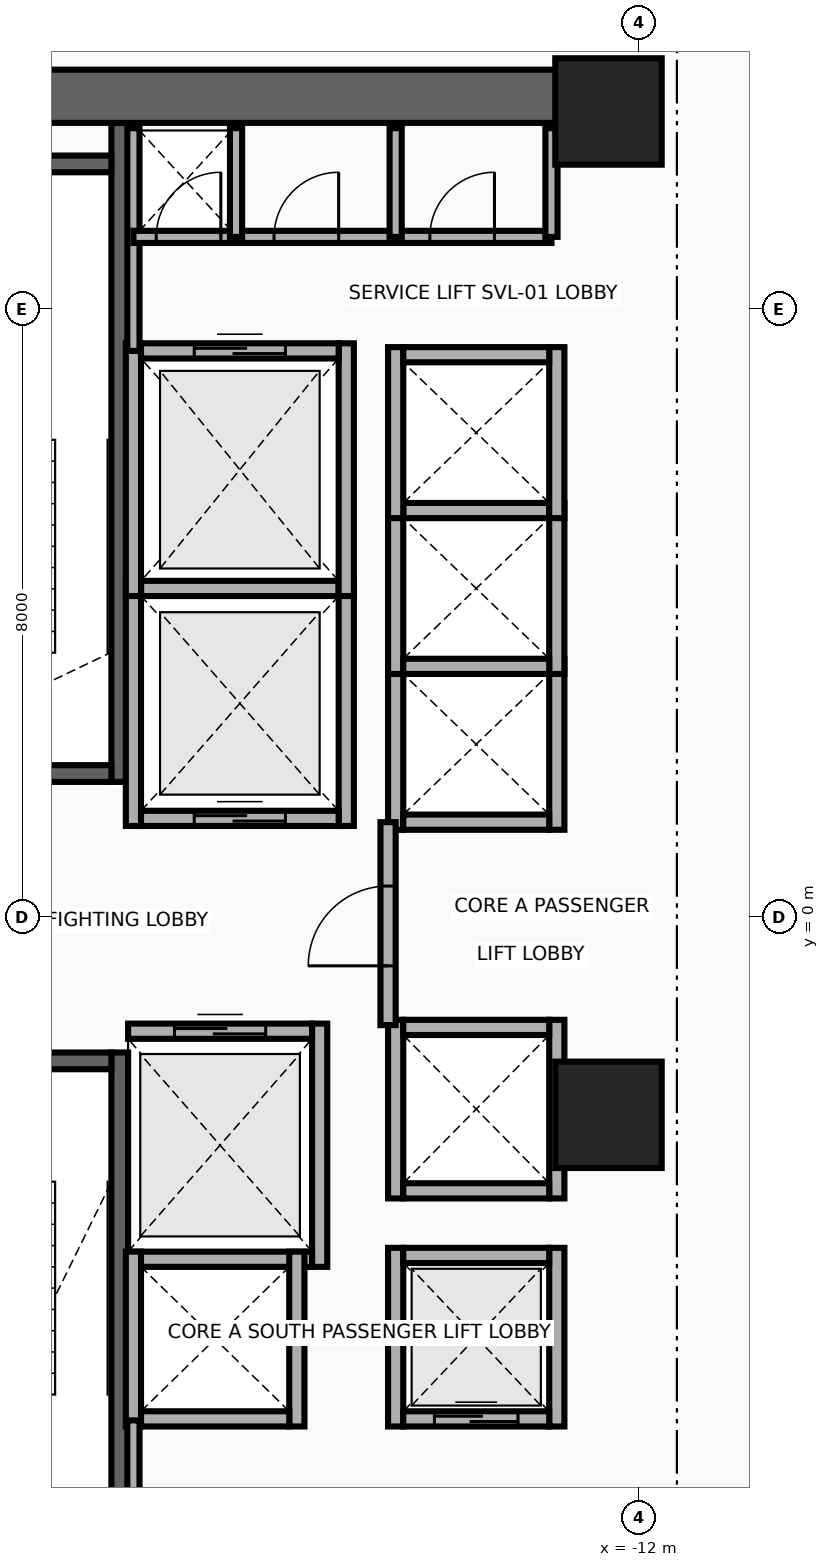
"""IFC4 building model, lengths in metres.
Left out: names, types, materials, properties, quantities, classifications, styles, units other than length and angle.
Written with IfcOpenShell. Run it as: python <this file> out.ifc"""

import sys

from ifc_helpers import new_model, si_unit, direction, frame, frame_2d, origin, origin_2d, place, context, subcontext, project, spatial, rectangle, extrude, source, transform, mapped, element, fill, save


model = new_model("IFC4")
c1 = context("Model", 3, precision=1e-05, world=origin(), true_north=direction((0.0, 1.0)))
c2 = subcontext(c1, "Body", "Model", "MODEL_VIEW")
j1 = project(units=[si_unit("LENGTHUNIT", "METRE"), si_unit("PLANEANGLEUNIT", "RADIAN")], contexts=[c1])
p1 = place(None, origin())
s1 = spatial("IfcSite", under=j1, at=p1, CompositionType="ELEMENT")
p2 = place(p1, origin())
s2 = spatial("IfcBuilding", under=s1, at=p2, CompositionType="ELEMENT")
p3 = place(p2, frame((0.0, 0.0, 55.6)))
s3 = spatial("IfcBuildingStorey", under=s2, at=p3, CompositionType="ELEMENT", Elevation=55.6)
p4 = place(p3, frame((-18.83, 1.78, 0.0), z_axis=(0.0, 0.0, 1.0), x_axis=(0.0, 1.0, 0.0)))
e1 = element("IfcWall", 1, at=p4, inside=s3, PredefinedType="SHEAR", context=c2, shape_type="SweptSolid", body=[
    extrude(rectangle(XDim=8.67, YDim=0.22, at=frame_2d((4.335, 0.0))), origin(), (0.0, 0.0, 1.0), 3.46),
])
p5 = place(p3, frame((-22.05, 1.89, 0.0), z_axis=(0.0, 0.0, 1.0), x_axis=(1.0, 0.0, 0.0)))
e2 = element("IfcWall", 2, at=p5, inside=s3, PredefinedType="SHEAR", context=c2, shape_type="SweptSolid", body=[
    extrude(rectangle(XDim=3.11, YDim=0.22, at=frame_2d((1.555, 0.0))), origin(), (0.0, 0.0, 1.0), 3.46),
])
p6 = place(p5, frame((1.0, 0.0, 0.0)))
e3 = element("IfcOpeningElement", 3, at=p6, cuts=e2, PredefinedType="OPENING", context=c2, shape_type="SweptSolid", body=[
    extrude(rectangle(XDim=1.1, YDim=2.15, at=frame_2d((0.55, 1.075))), frame((0.0, 0.125, 0.0), z_axis=(0.0, -1.0, 0.0), x_axis=(1.0, 0.0, 0.0)), (0.0, 0.0, 1.0), 0.25),
])
p7 = place(p3, frame((-22.05, 9.91, 0.0), z_axis=(0.0, 0.0, 1.0), x_axis=(1.0, 0.0, 0.0)))
e4 = element("IfcWall", 4, at=p7, inside=s3, PredefinedType="SHEAR", context=c2, shape_type="SweptSolid", body=[
    extrude(rectangle(XDim=3.11, YDim=0.22, at=frame_2d((1.555, 0.0))), origin(), (0.0, 0.0, 1.0), 3.46),
])
p8 = place(p3, frame((-18.83, -10.45, 0.0), z_axis=(0.0, 0.0, 1.0), x_axis=(0.0, 1.0, 0.0)))
e5 = element("IfcWall", 5, at=p8, inside=s3, PredefinedType="SHEAR", context=c2, shape_type="SweptSolid", body=[
    extrude(rectangle(XDim=8.67, YDim=0.22, at=frame_2d((4.335, 0.0))), origin(), (0.0, 0.0, 1.0), 3.46),
])
p9 = place(p3, frame((-22.05, -1.89, 0.0), z_axis=(0.0, 0.0, 1.0), x_axis=(1.0, 0.0, 0.0)))
e6 = element("IfcWall", 6, at=p9, inside=s3, PredefinedType="SHEAR", context=c2, shape_type="SweptSolid", body=[
    extrude(rectangle(XDim=3.11, YDim=0.22, at=frame_2d((1.555, 0.0))), origin(), (0.0, 0.0, 1.0), 3.46),
])
p10 = place(p9, frame((1.0, 0.0, 0.0)))
e7 = element("IfcOpeningElement", 7, at=p10, cuts=e6, PredefinedType="OPENING", context=c2, shape_type="SweptSolid", body=[
    extrude(rectangle(XDim=1.1, YDim=2.15, at=frame_2d((0.55, 1.075))), frame((0.0, 0.125, 0.0), z_axis=(0.0, -1.0, 0.0), x_axis=(1.0, 0.0, 0.0)), (0.0, 0.0, 1.0), 0.25),
])
p11 = place(p3, frame((-22.65, 10.8, 0.0), z_axis=(0.0, 0.0, 1.0), x_axis=(1.0, 0.0, 0.0)))
e8 = element("IfcWall", 8, at=p11, inside=s3, PredefinedType="SHEAR", context=c2, shape_type="SweptSolid", body=[
    extrude(rectangle(XDim=10.25, YDim=0.7, at=frame_2d((5.125, 0.0))), origin(), (0.0, 0.0, 1.0), 3.46),
])
m1 = source(origin(), c2, "Body", "SweptSolid", [
    extrude(rectangle(XDim=1.4, YDim=1.4, at=origin_2d()), origin(), (0.0, 0.0, 1.0), 3.7),
])
for number, where, z_axis, x_axis in (
    (9, (-12.4, -2.6, 0.0), (0.0, 0.0, 1.0), (1.0, 0.0, 0.0)),
    (10, (-12.4, 10.6, 0.0), (0.0, 0.0, 1.0), (1.0, 0.0, 0.0)),
):
    element("IfcColumn", number, at=place(p3, frame(where, z_axis=z_axis, x_axis=x_axis)), inside=s3, PredefinedType="COLUMN", context=c2, shape_type="MappedRepresentation", body=[
        mapped(m1, transform((0.0, 0.0, 0.0), x_axis=(1.0, 0.0, 0.0), y_axis=(0.0, 1.0, 0.0), z_axis=(0.0, 0.0, 1.0), scale=1.0)),
    ])
for number, where, z_axis, x_axis in (
    (11, (-18.65, 1.2, 0.0), (0.0, 0.0, 1.0), (0.0, 1.0, 0.0)),
    (12, (-15.85, 1.2, 0.0), (0.0, 0.0, 1.0), (0.0, 1.0, 0.0)),
):
    element("IfcWall", number, at=place(p3, frame(where, z_axis=z_axis, x_axis=x_axis)), inside=s3, PredefinedType="MOVABLE", context=c2, shape_type="SweptSolid", body=[
        extrude(rectangle(XDim=3.225, YDim=0.2, at=frame_2d((1.613, 0.0))), origin(), (0.0, 0.0, 1.0), 3.46),
    ])
p12 = place(p3, frame((-18.55, 1.3, 0.0), z_axis=(0.0, 0.0, 1.0), x_axis=(1.0, 0.0, 0.0)))
e13 = element("IfcWall", 13, at=p12, inside=s3, PredefinedType="MOVABLE", context=c2, shape_type="SweptSolid", body=[
    extrude(rectangle(XDim=2.6, YDim=0.2, at=frame_2d((1.3, 0.0))), origin(), (0.0, 0.0, 1.0), 3.46),
])
p13 = place(p12, frame((0.7, 0.0, 0.0)))
e14 = element("IfcOpeningElement", 14, at=p13, cuts=e13, PredefinedType="OPENING", context=c2, shape_type="SweptSolid", body=[
    extrude(rectangle(XDim=1.2, YDim=2.1, at=frame_2d((0.6, 1.05))), frame((0.0, 0.115, 0.0), z_axis=(0.0, -1.0, 0.0), x_axis=(1.0, 0.0, 0.0)), (0.0, 0.0, 1.0), 0.23),
])
p14 = place(p3, frame((-18.55, 4.325, 0.0), z_axis=(0.0, 0.0, 1.0), x_axis=(1.0, 0.0, 0.0)))
e15 = element("IfcWall", 15, at=p14, inside=s3, PredefinedType="MOVABLE", context=c2, shape_type="SweptSolid", body=[
    extrude(rectangle(XDim=2.6, YDim=0.2, at=frame_2d((1.3, 0.0))), origin(), (0.0, 0.0, 1.0), 3.46),
])
p15 = place(p3, frame((-16.2, -4.6, 0.0), z_axis=(0.0, 0.0, 1.0), x_axis=(0.0, 1.0, 0.0)))
e16 = element("IfcWall", 16, at=p15, inside=s3, PredefinedType="MOVABLE", context=c2, shape_type="SweptSolid", body=[
    extrude(rectangle(XDim=3.2, YDim=0.2, at=frame_2d((1.6, 0.0))), origin(), (0.0, 0.0, 1.0), 3.46),
])
p16 = place(p3, frame((-18.72, -4.5, 0.0), z_axis=(0.0, 0.0, 1.0), x_axis=(1.0, 0.0, 0.0)))
e17 = element("IfcWall", 17, at=p16, inside=s3, PredefinedType="MOVABLE", context=c2, shape_type="SweptSolid", body=[
    extrude(rectangle(XDim=2.42, YDim=0.2, at=frame_2d((1.21, 0.0))), origin(), (0.0, 0.0, 1.0), 3.46),
])
p17 = place(p3, frame((-18.72, -1.5, 0.0), z_axis=(0.0, 0.0, 1.0), x_axis=(1.0, 0.0, 0.0)))
e18 = element("IfcWall", 18, at=p17, inside=s3, PredefinedType="MOVABLE", context=c2, shape_type="SweptSolid", body=[
    extrude(rectangle(XDim=2.42, YDim=0.2, at=frame_2d((1.21, 0.0))), origin(), (0.0, 0.0, 1.0), 3.46),
])
p18 = place(p17, frame((0.61, 0.0, 0.0)))
e19 = element("IfcOpeningElement", 19, at=p18, cuts=e18, PredefinedType="OPENING", context=c2, shape_type="SweptSolid", body=[
    extrude(rectangle(XDim=1.2, YDim=2.1, at=frame_2d((0.6, 1.05))), frame((0.0, 0.115, 0.0), z_axis=(0.0, -1.0, 0.0), x_axis=(1.0, 0.0, 0.0)), (0.0, 0.0, 1.0), 0.23),
])
for number, where, z_axis, x_axis in (
    (20, (-18.65, 4.225, 0.0), (0.0, 0.0, 1.0), (0.0, 1.0, 0.0)),
    (21, (-15.85, 4.225, 0.0), (0.0, 0.0, 1.0), (0.0, 1.0, 0.0)),
):
    element("IfcWall", number, at=place(p3, frame(where, z_axis=z_axis, x_axis=x_axis)), inside=s3, PredefinedType="MOVABLE", context=c2, shape_type="SweptSolid", body=[
        extrude(rectangle(XDim=3.325, YDim=0.2, at=frame_2d((1.663, 0.0))), origin(), (0.0, 0.0, 1.0), 3.46),
    ])
p19 = place(p3, frame((-18.55, 7.45, 0.0), z_axis=(0.0, 0.0, 1.0), x_axis=(1.0, 0.0, 0.0)))
e22 = element("IfcWall", 22, at=p19, inside=s3, PredefinedType="MOVABLE", context=c2, shape_type="SweptSolid", body=[
    extrude(rectangle(XDim=2.6, YDim=0.2, at=frame_2d((1.3, 0.0))), origin(), (0.0, 0.0, 1.0), 3.46),
])
p20 = place(p19, frame((0.7, 0.0, 0.0)))
e23 = element("IfcOpeningElement", 23, at=p20, cuts=e22, PredefinedType="OPENING", context=c2, shape_type="SweptSolid", body=[
    extrude(rectangle(XDim=1.2, YDim=2.1, at=frame_2d((0.6, 1.05))), frame((0.0, 0.115, 0.0), z_axis=(0.0, -1.0, 0.0), x_axis=(1.0, 0.0, 0.0)), (0.0, 0.0, 1.0), 0.23),
])
for number, where, z_axis, x_axis in (
    (24, (-15.2, -6.7, 0.0), (0.0, 0.0, 1.0), (0.0, 1.0, 0.0)),
    (25, (-13.08, -6.7, 0.0), (0.0, 0.0, 1.0), (0.0, 1.0, 0.0)),
):
    element("IfcWall", number, at=place(p3, frame(where, z_axis=z_axis, x_axis=x_axis)), inside=s3, PredefinedType="MOVABLE", context=c2, shape_type="SweptSolid", body=[
        extrude(rectangle(XDim=2.35, YDim=0.2, at=frame_2d((1.175, 0.0))), origin(), (0.0, 0.0, 1.0), 3.46),
    ])
p21 = place(p3, frame((-15.1, -6.6, 0.0), z_axis=(0.0, 0.0, 1.0), x_axis=(1.0, 0.0, 0.0)))
e26 = element("IfcWall", 26, at=p21, inside=s3, PredefinedType="MOVABLE", context=c2, shape_type="SweptSolid", body=[
    extrude(rectangle(XDim=1.92, YDim=0.2, at=frame_2d((0.96, 0.0))), origin(), (0.0, 0.0, 1.0), 3.46),
])
p22 = place(p21, frame((0.41, 0.0, 0.0)))
e27 = element("IfcOpeningElement", 27, at=p22, cuts=e26, PredefinedType="OPENING", context=c2, shape_type="SweptSolid", body=[
    extrude(rectangle(XDim=1.1, YDim=2.1, at=frame_2d((0.55, 1.05))), frame((0.0, 0.115, 0.0), z_axis=(0.0, -1.0, 0.0), x_axis=(1.0, 0.0, 0.0)), (0.0, 0.0, 1.0), 0.23),
])
p23 = place(p3, frame((-15.1, -4.45, 0.0), z_axis=(0.0, 0.0, 1.0), x_axis=(1.0, 0.0, 0.0)))
e28 = element("IfcWall", 28, at=p23, inside=s3, PredefinedType="MOVABLE", context=c2, shape_type="SweptSolid", body=[
    extrude(rectangle(XDim=1.92, YDim=0.2, at=frame_2d((0.96, 0.0))), origin(), (0.0, 0.0, 1.0), 3.46),
])
for number, where, z_axis, x_axis in (
    (29, (-15.2, 1.15, 0.0), (0.0, 0.0, 1.0), (0.0, 1.0, 0.0)),
    (30, (-13.08, 1.15, 0.0), (0.0, 0.0, 1.0), (0.0, 1.0, 0.0)),
):
    element("IfcWall", number, at=place(p3, frame(where, z_axis=z_axis, x_axis=x_axis)), inside=s3, PredefinedType="MOVABLE", context=c2, shape_type="SweptSolid", body=[
        extrude(rectangle(XDim=2.25, YDim=0.2, at=frame_2d((1.125, 0.0))), origin(), (0.0, 0.0, 1.0), 3.46),
    ])
p24 = place(p3, frame((-15.1, 1.25, 0.0), z_axis=(0.0, 0.0, 1.0), x_axis=(1.0, 0.0, 0.0)))
e31 = element("IfcWall", 31, at=p24, inside=s3, PredefinedType="MOVABLE", context=c2, shape_type="SweptSolid", body=[
    extrude(rectangle(XDim=1.92, YDim=0.2, at=frame_2d((0.96, 0.0))), origin(), (0.0, 0.0, 1.0), 3.46),
])
for number, where, z_axis, x_axis in (
    (32, (-15.2, 3.2, 0.0), (0.0, 0.0, 1.0), (0.0, 1.0, 0.0)),
    (33, (-13.08, 3.2, 0.0), (0.0, 0.0, 1.0), (0.0, 1.0, 0.0)),
):
    element("IfcWall", number, at=place(p3, frame(where, z_axis=z_axis, x_axis=x_axis)), inside=s3, PredefinedType="MOVABLE", context=c2, shape_type="SweptSolid", body=[
        extrude(rectangle(XDim=2.25, YDim=0.2, at=frame_2d((1.125, 0.0))), origin(), (0.0, 0.0, 1.0), 3.46),
    ])
for number, where, z_axis, x_axis in (
    (34, (-15.1, 3.3, 0.0), (0.0, 0.0, 1.0), (1.0, 0.0, 0.0)),
    (35, (-15.1, 5.35, 0.0), (0.0, 0.0, 1.0), (1.0, 0.0, 0.0)),
):
    element("IfcWall", number, at=place(p3, frame(where, z_axis=z_axis, x_axis=x_axis)), inside=s3, PredefinedType="MOVABLE", context=c2, shape_type="SweptSolid", body=[
        extrude(rectangle(XDim=1.92, YDim=0.2, at=frame_2d((0.96, 0.0))), origin(), (0.0, 0.0, 1.0), 3.46),
    ])
for number, where, z_axis, x_axis in (
    (36, (-15.2, 5.25, 0.0), (0.0, 0.0, 1.0), (0.0, 1.0, 0.0)),
    (37, (-13.08, 5.25, 0.0), (0.0, 0.0, 1.0), (0.0, 1.0, 0.0)),
):
    element("IfcWall", number, at=place(p3, frame(where, z_axis=z_axis, x_axis=x_axis)), inside=s3, PredefinedType="MOVABLE", context=c2, shape_type="SweptSolid", body=[
        extrude(rectangle(XDim=2.25, YDim=0.2, at=frame_2d((1.125, 0.0))), origin(), (0.0, 0.0, 1.0), 3.46),
    ])
p25 = place(p3, frame((-15.1, 7.4, 0.0), z_axis=(0.0, 0.0, 1.0), x_axis=(1.0, 0.0, 0.0)))
e38 = element("IfcWall", 38, at=p25, inside=s3, PredefinedType="MOVABLE", context=c2, shape_type="SweptSolid", body=[
    extrude(rectangle(XDim=1.92, YDim=0.2, at=frame_2d((0.96, 0.0))), origin(), (0.0, 0.0, 1.0), 3.46),
])
for number, where, z_axis, x_axis in (
    (39, (-18.65, -6.7, 0.0), (0.0, 0.0, 1.0), (0.0, 1.0, 0.0)),
    (40, (-16.5, -6.7, 0.0), (0.0, 0.0, 1.0), (0.0, 1.0, 0.0)),
):
    element("IfcWall", number, at=place(p3, frame(where, z_axis=z_axis, x_axis=x_axis)), inside=s3, PredefinedType="MOVABLE", context=c2, shape_type="SweptSolid", body=[
        extrude(rectangle(XDim=2.3, YDim=0.2, at=frame_2d((1.15, 0.0))), origin(), (0.0, 0.0, 1.0), 3.46),
    ])
p26 = place(p3, frame((-18.55, -6.6, 0.0), z_axis=(0.0, 0.0, 1.0), x_axis=(1.0, 0.0, 0.0)))
e41 = element("IfcWall", 41, at=p26, inside=s3, PredefinedType="MOVABLE", context=c2, shape_type="SweptSolid", body=[
    extrude(rectangle(XDim=1.95, YDim=0.2, at=frame_2d((0.975, 0.0))), origin(), (0.0, 0.0, 1.0), 3.46),
])
for number, where, z_axis, x_axis in (
    (42, (-15.2, -3.7, 0.0), (0.0, 0.0, 1.0), (0.0, 1.0, 0.0)),
    (43, (-13.08, -3.7, 0.0), (0.0, 0.0, 1.0), (0.0, 1.0, 0.0)),
):
    element("IfcWall", number, at=place(p3, frame(where, z_axis=z_axis, x_axis=x_axis)), inside=s3, PredefinedType="MOVABLE", context=c2, shape_type="SweptSolid", body=[
        extrude(rectangle(XDim=2.35, YDim=0.2, at=frame_2d((1.175, 0.0))), origin(), (0.0, 0.0, 1.0), 3.46),
    ])
for number, where, z_axis, x_axis in (
    (44, (-15.1, -3.6, 0.0), (0.0, 0.0, 1.0), (1.0, 0.0, 0.0)),
    (45, (-15.1, -1.45, 0.0), (0.0, 0.0, 1.0), (1.0, 0.0, 0.0)),
):
    element("IfcWall", number, at=place(p3, frame(where, z_axis=z_axis, x_axis=x_axis)), inside=s3, PredefinedType="MOVABLE", context=c2, shape_type="SweptSolid", body=[
        extrude(rectangle(XDim=1.92, YDim=0.2, at=frame_2d((0.96, 0.0))), origin(), (0.0, 0.0, 1.0), 3.46),
    ])
p27 = place(p3, frame((-15.3, -1.42, 0.0), z_axis=(0.0, 0.0, 1.0), x_axis=(0.0, 1.0, 0.0)))
e46 = element("IfcWall", 46, at=p27, inside=s3, PredefinedType="PARTITIONING", context=c2, shape_type="SweptSolid", body=[
    extrude(rectangle(XDim=2.67, YDim=0.2, at=frame_2d((1.335, 0.0))), origin(), (0.0, 0.0, 1.0), 3.46),
])
p28 = place(p27, frame((0.78, 0.0, 0.0)))
e47 = element("IfcOpeningElement", 47, at=p28, cuts=e46, PredefinedType="OPENING", context=c2, shape_type="SweptSolid", body=[
    extrude(rectangle(XDim=1.05, YDim=2.15, at=frame_2d((0.525, 1.075))), frame((0.0, 0.115, 0.0), z_axis=(0.0, -1.0, 0.0), x_axis=(1.0, 0.0, 0.0)), (0.0, 0.0, 1.0), 0.23),
])
p29 = place(p3, frame((-18.65, 7.45, 0.0), z_axis=(0.0, 0.0, 1.0), x_axis=(0.0, 1.0, 0.0)))
e48 = element("IfcWall", 48, at=p29, inside=s3, PredefinedType="PARTITIONING", context=c2, shape_type="SweptSolid", body=[
    extrude(rectangle(XDim=2.93, YDim=0.16, at=frame_2d((1.465, 0.0))), origin(), (0.0, 0.0, 1.0), 3.46),
])
p30 = place(p3, frame((-18.65, -8.18, 0.0), z_axis=(0.0, 0.0, 1.0), x_axis=(0.0, 1.0, 0.0)))
e49 = element("IfcWall", 49, at=p30, inside=s3, PredefinedType="PARTITIONING", context=c2, shape_type="SweptSolid", body=[
    extrude(rectangle(XDim=1.56, YDim=0.16, at=frame_2d((0.78, 0.0))), origin(), (0.0, 0.0, 1.0), 3.46),
])
p31 = place(p3, frame((-18.65, 8.95, 0.0), z_axis=(0.0, 0.0, 1.0), x_axis=(1.0, 0.0, 0.0)))
e50 = element("IfcWall", 50, at=p31, inside=s3, PredefinedType="PARTITIONING", context=c2, shape_type="SweptSolid", body=[
    extrude(rectangle(XDim=5.5, YDim=0.16, at=frame_2d((2.75, 0.0))), origin(), (0.0, 0.0, 1.0), 3.46),
])
p32 = place(p31, frame((0.3, 0.0, 0.0)))
e51 = element("IfcOpeningElement", 51, at=p32, cuts=e50, PredefinedType="OPENING", context=c2, shape_type="SweptSolid", body=[
    extrude(rectangle(XDim=0.85, YDim=2.05, at=frame_2d((0.425, 1.025))), frame((0.0, 0.095, 0.0), z_axis=(0.0, -1.0, 0.0), x_axis=(1.0, 0.0, 0.0)), (0.0, 0.0, 1.0), 0.19),
])
p33 = place(p31, frame((1.85, 0.0, 0.0)))
e52 = element("IfcOpeningElement", 52, at=p33, cuts=e50, PredefinedType="OPENING", context=c2, shape_type="SweptSolid", body=[
    extrude(rectangle(XDim=0.85, YDim=2.05, at=frame_2d((0.425, 1.025))), frame((0.0, 0.095, 0.0), z_axis=(0.0, -1.0, 0.0), x_axis=(1.0, 0.0, 0.0)), (0.0, 0.0, 1.0), 0.19),
])
p34 = place(p31, frame((3.9, 0.0, 0.0)))
e53 = element("IfcOpeningElement", 53, at=p34, cuts=e50, PredefinedType="OPENING", context=c2, shape_type="SweptSolid", body=[
    extrude(rectangle(XDim=0.85, YDim=2.05, at=frame_2d((0.425, 1.025))), frame((0.0, 0.095, 0.0), z_axis=(0.0, -1.0, 0.0), x_axis=(1.0, 0.0, 0.0)), (0.0, 0.0, 1.0), 0.19),
])
for number, where, z_axis, x_axis in (
    (54, (-13.15, 8.95, 0.0), (0.0, 0.0, 1.0), (0.0, 1.0, 0.0)),
    (55, (-17.3, 8.95, 0.0), (0.0, 0.0, 1.0), (0.0, 1.0, 0.0)),
    (56, (-15.2, 8.95, 0.0), (0.0, 0.0, 1.0), (0.0, 1.0, 0.0)),
):
    element("IfcWall", number, at=place(p3, frame(where, z_axis=z_axis, x_axis=x_axis)), inside=s3, PredefinedType="PARTITIONING", context=c2, shape_type="SweptSolid", body=[
        extrude(rectangle(XDim=1.43, YDim=0.16, at=frame_2d((0.715, 0.0))), origin(), (0.0, 0.0, 1.0), 3.46),
    ])
p35 = place(p13, origin())
e57 = element("IfcDoor", 57, at=p35, inside=s3, OperationType="DOUBLE_DOOR_SLIDING", PredefinedType="DOOR", context=c2, shape_type="SweptSolid", body=[
    extrude(rectangle(XDim=1.2, YDim=2.1, at=frame_2d((0.6, 1.05))), frame((0.0, 0.025, 0.0), z_axis=(0.0, -1.0, 0.0), x_axis=(1.0, 0.0, 0.0)), (0.0, 0.0, 1.0), 0.05),
])
fill(e14, e57)
p36 = place(p18, origin())
e58 = element("IfcDoor", 58, at=p36, inside=s3, OperationType="DOUBLE_DOOR_SLIDING", PredefinedType="DOOR", context=c2, shape_type="SweptSolid", body=[
    extrude(rectangle(XDim=1.2, YDim=2.1, at=frame_2d((0.6, 1.05))), frame((0.0, 0.025, 0.0), z_axis=(0.0, -1.0, 0.0), x_axis=(1.0, 0.0, 0.0)), (0.0, 0.0, 1.0), 0.05),
])
fill(e19, e58)
p37 = place(p20, origin())
e59 = element("IfcDoor", 59, at=p37, inside=s3, OperationType="DOUBLE_DOOR_SLIDING", PredefinedType="DOOR", context=c2, shape_type="SweptSolid", body=[
    extrude(rectangle(XDim=1.2, YDim=2.1, at=frame_2d((0.6, 1.05))), frame((0.0, 0.025, 0.0), z_axis=(0.0, -1.0, 0.0), x_axis=(1.0, 0.0, 0.0)), (0.0, 0.0, 1.0), 0.05),
])
fill(e23, e59)
p38 = place(p22, origin())
e60 = element("IfcDoor", 60, at=p38, inside=s3, OperationType="DOUBLE_DOOR_SLIDING", PredefinedType="DOOR", context=c2, shape_type="SweptSolid", body=[
    extrude(rectangle(XDim=1.1, YDim=2.1, at=frame_2d((0.55, 1.05))), frame((0.0, 0.025, 0.0), z_axis=(0.0, -1.0, 0.0), x_axis=(1.0, 0.0, 0.0)), (0.0, 0.0, 1.0), 0.05),
])
fill(e27, e60)
p39 = place(p28, origin())
e61 = element("IfcDoor", 61, at=p39, inside=s3, OperationType="SINGLE_SWING_RIGHT", PredefinedType="DOOR", context=c2, shape_type="SweptSolid", body=[
    extrude(rectangle(XDim=1.05, YDim=2.15, at=frame_2d((0.525, 1.075))), frame((0.0, 0.025, 0.0), z_axis=(0.0, -1.0, 0.0), x_axis=(1.0, 0.0, 0.0)), (0.0, 0.0, 1.0), 0.05),
])
fill(e47, e61)
p40 = place(p32, origin())
e62 = element("IfcDoor", 62, at=p40, inside=s3, OperationType="SINGLE_SWING_LEFT", PredefinedType="DOOR", context=c2, shape_type="SweptSolid", body=[
    extrude(rectangle(XDim=0.85, YDim=2.05, at=frame_2d((0.425, 1.025))), frame((0.0, 0.025, 0.0), z_axis=(0.0, -1.0, 0.0), x_axis=(1.0, 0.0, 0.0)), (0.0, 0.0, 1.0), 0.05),
])
fill(e51, e62)
p41 = place(p33, origin())
e63 = element("IfcDoor", 63, at=p41, inside=s3, OperationType="SINGLE_SWING_RIGHT", PredefinedType="DOOR", context=c2, shape_type="SweptSolid", body=[
    extrude(rectangle(XDim=0.85, YDim=2.05, at=frame_2d((0.425, 1.025))), frame((0.0, 0.025, 0.0), z_axis=(0.0, -1.0, 0.0), x_axis=(1.0, 0.0, 0.0)), (0.0, 0.0, 1.0), 0.05),
])
fill(e52, e63)
p42 = place(p34, origin())
e64 = element("IfcDoor", 64, at=p42, inside=s3, OperationType="SINGLE_SWING_LEFT", PredefinedType="DOOR", context=c2, shape_type="SweptSolid", body=[
    extrude(rectangle(XDim=0.85, YDim=2.05, at=frame_2d((0.425, 1.025))), frame((0.0, 0.025, 0.0), z_axis=(0.0, -1.0, 0.0), x_axis=(1.0, 0.0, 0.0)), (0.0, 0.0, 1.0), 0.05),
])
fill(e53, e64)
save(model, sys.argv[1])
